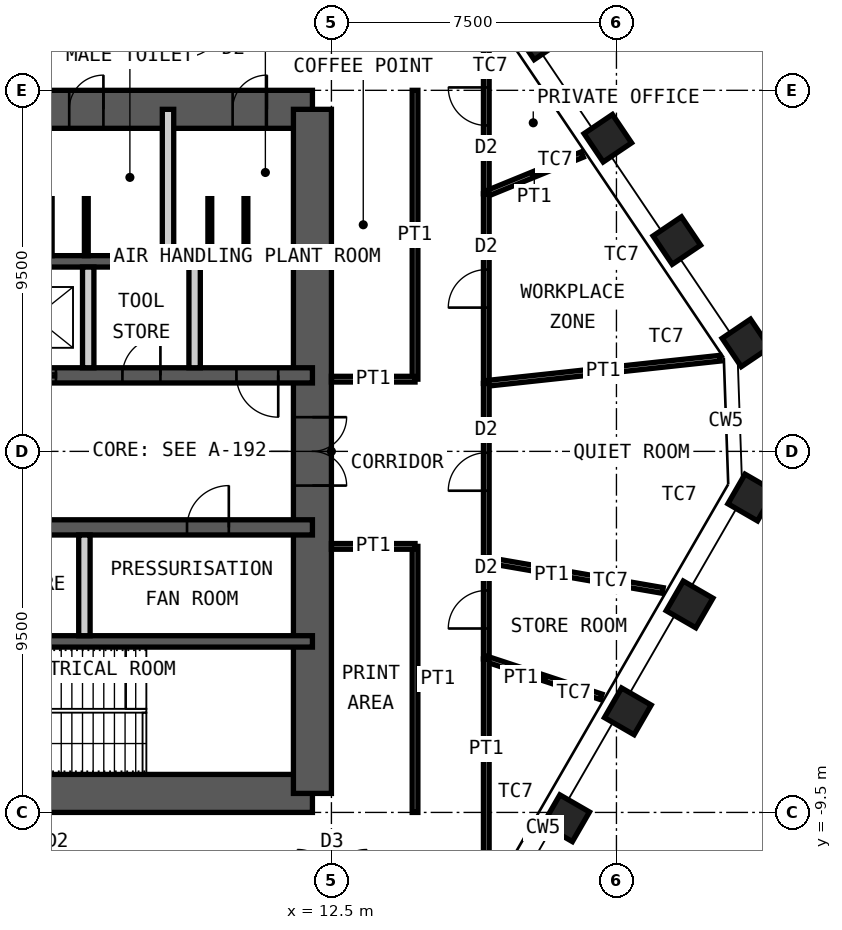
"""IFC4 building model, lengths in metres.
Left out: names, types, materials, properties, quantities, classifications, styles, units other than length and angle.
Written with IfcOpenShell. Run it as: python <this file> out.ifc"""

import sys

from ifc_helpers import new_model, si_unit, direction, frame, frame_2d, origin, origin_2d, place, context, subcontext, project, spatial, rectangle, hollow_rectangle, extrude, element, fill, save


model = new_model("IFC4")
c1 = context("Model", 3, precision=1e-05, world=origin(), true_north=direction((0.0, 1.0)))
c2 = subcontext(c1, "Body", "Model", "MODEL_VIEW")
j1 = project(units=[si_unit("LENGTHUNIT", "METRE"), si_unit("PLANEANGLEUNIT", "RADIAN")], contexts=[c1])
p1 = place(None, origin())
s1 = spatial("IfcSite", under=j1, at=p1, CompositionType="ELEMENT")
p2 = place(p1, origin())
s2 = spatial("IfcBuilding", under=s1, at=p2, CompositionType="ELEMENT")
p3 = place(p2, frame((0.0, 0.0, 283.0)))
s3 = spatial("IfcBuildingStorey", under=s2, at=p3, CompositionType="ELEMENT", Elevation=283.0)
for number, where, z_axis, x_axis in (
    (1, (17.957, 10.932, 0.0), (0.0, 0.0, 1.0), (-0.559, 0.829, 0.0)),
    (2, (19.773, 8.239, 0.0), (0.0, 0.0, 1.0), (-0.559, 0.829, 0.0)),
    (3, (21.589, 5.547, 0.0), (0.0, 0.0, 1.0), (-0.559, 0.829, 0.0)),
    (4, (23.406, 2.854, 0.0), (0.0, 0.0, 1.0), (-0.559, 0.829, 0.0)),
    (5, (23.548, -1.214, 0.0), (0.0, 0.0, 1.0), (0.5, 0.866, 0.0)),
    (6, (21.924, -4.027, 0.0), (0.0, 0.0, 1.0), (0.5, 0.866, 0.0)),
    (7, (20.3, -6.84, 0.0), (0.0, 0.0, 1.0), (0.5, 0.866, 0.0)),
    (8, (18.676, -9.653, 0.0), (0.0, 0.0, 1.0), (0.5, 0.866, 0.0)),
):
    element("IfcColumn", number, at=place(p3, frame(where, z_axis=z_axis, x_axis=x_axis)), inside=s3, PredefinedType="COLUMN", context=c2, shape_type="SweptSolid", body=[
        extrude(hollow_rectangle(XDim=0.9, YDim=0.9, WallThickness=0.06, at=origin_2d()), origin(), (0.0, 0.0, 1.0), 4.2),
    ])
p4 = place(p3, frame((-12.0, 9.0, 0.0), z_axis=(0.0, 0.0, 1.0), x_axis=(1.0, 0.0, 0.0)))
e9 = element("IfcWall", 9, at=p4, inside=s3, PredefinedType="SHEAR", context=c2, shape_type="SweptSolid", body=[
    extrude(rectangle(XDim=24.0, YDim=1.0, at=frame_2d((12.0, 0.0))), origin(), (0.0, 0.0, 1.0), 4.2),
])
p5 = place(p4, frame((10.4, 0.0, 0.0)))
e10 = element("IfcOpeningElement", 10, at=p5, cuts=e9, PredefinedType="OPENING", context=c2, shape_type="SweptSolid", body=[
    extrude(rectangle(XDim=1.0, YDim=2.1, at=frame_2d((0.5, 1.05))), frame((0.0, 0.51, 0.0), z_axis=(0.0, -1.0, 0.0), x_axis=(1.0, 0.0, 0.0)), (0.0, 0.0, 1.0), 1.02),
])
p6 = place(p4, frame((17.6, 0.0, 0.0)))
e11 = element("IfcOpeningElement", 11, at=p6, cuts=e9, PredefinedType="OPENING", context=c2, shape_type="SweptSolid", body=[
    extrude(rectangle(XDim=0.9, YDim=2.1, at=frame_2d((0.45, 1.05))), frame((0.0, 0.51, 0.0), z_axis=(0.0, -1.0, 0.0), x_axis=(1.0, 0.0, 0.0)), (0.0, 0.0, 1.0), 1.02),
])
p7 = place(p4, frame((21.9, 0.0, 0.0)))
e12 = element("IfcOpeningElement", 12, at=p7, cuts=e9, PredefinedType="OPENING", context=c2, shape_type="SweptSolid", body=[
    extrude(rectangle(XDim=0.9, YDim=2.1, at=frame_2d((0.45, 1.05))), frame((0.0, 0.51, 0.0), z_axis=(0.0, -1.0, 0.0), x_axis=(1.0, 0.0, 0.0)), (0.0, 0.0, 1.0), 1.02),
])
p8 = place(p3, frame((-12.0, -9.0, 0.0), z_axis=(0.0, 0.0, 1.0), x_axis=(1.0, 0.0, 0.0)))
e13 = element("IfcWall", 13, at=p8, inside=s3, PredefinedType="SHEAR", context=c2, shape_type="SweptSolid", body=[
    extrude(rectangle(XDim=24.0, YDim=1.0, at=frame_2d((12.0, 0.0))), origin(), (0.0, 0.0, 1.0), 4.2),
])
p9 = place(p8, frame((1.35, 0.0, 0.0)))
e14 = element("IfcOpeningElement", 14, at=p9, cuts=e13, PredefinedType="OPENING", context=c2, shape_type="SweptSolid", body=[
    extrude(rectangle(XDim=1.0, YDim=2.1, at=frame_2d((0.5, 1.05))), frame((0.0, 0.51, 0.0), z_axis=(0.0, -1.0, 0.0), x_axis=(1.0, 0.0, 0.0)), (0.0, 0.0, 1.0), 1.02),
])
p10 = place(p8, frame((5.325, 0.0, 0.0)))
e15 = element("IfcOpeningElement", 15, at=p10, cuts=e13, PredefinedType="OPENING", context=c2, shape_type="SweptSolid", body=[
    extrude(rectangle(XDim=1.15, YDim=2.1, at=frame_2d((0.575, 1.05))), frame((0.0, 0.51, 0.0), z_axis=(0.0, -1.0, 0.0), x_axis=(1.0, 0.0, 0.0)), (0.0, 0.0, 1.0), 1.02),
])
p11 = place(p8, frame((12.6, 0.0, 0.0)))
e16 = element("IfcOpeningElement", 16, at=p11, cuts=e13, PredefinedType="OPENING", context=c2, shape_type="SweptSolid", body=[
    extrude(rectangle(XDim=1.0, YDim=2.1, at=frame_2d((0.5, 1.05))), frame((0.0, 0.51, 0.0), z_axis=(0.0, -1.0, 0.0), x_axis=(1.0, 0.0, 0.0)), (0.0, 0.0, 1.0), 1.02),
])
p12 = place(p3, frame((12.0, -9.0, 0.0), z_axis=(0.0, 0.0, 1.0), x_axis=(0.0, 1.0, 0.0)))
e17 = element("IfcWall", 17, at=p12, inside=s3, PredefinedType="SHEAR", context=c2, shape_type="SweptSolid", body=[
    extrude(rectangle(XDim=18.0, YDim=1.0, at=frame_2d((9.0, 0.0))), origin(), (0.0, 0.0, 1.0), 4.2),
])
p13 = place(p12, frame((8.1, 0.0, 0.0)))
e18 = element("IfcOpeningElement", 18, at=p13, cuts=e17, PredefinedType="OPENING", context=c2, shape_type="SweptSolid", body=[
    extrude(rectangle(XDim=1.8, YDim=2.1, at=frame_2d((0.9, 1.05))), frame((0.0, 0.51, 0.0), z_axis=(0.0, -1.0, 0.0), x_axis=(1.0, 0.0, 0.0)), (0.0, 0.0, 1.0), 1.02),
])
p14 = place(p3, frame((-12.0, 5.0, 0.0), z_axis=(0.0, 0.0, 1.0), x_axis=(1.0, 0.0, 0.0)))
e19 = element("IfcWall", 19, at=p14, inside=s3, PredefinedType="SHEAR", context=c2, shape_type="SweptSolid", body=[
    extrude(rectangle(XDim=24.0, YDim=0.3, at=frame_2d((12.0, 0.0))), origin(), (0.0, 0.0, 1.0), 4.2),
])
p15 = place(p3, frame((-12.0, 2.0, 0.0), z_axis=(0.0, 0.0, 1.0), x_axis=(1.0, 0.0, 0.0)))
e20 = element("IfcWall", 20, at=p15, inside=s3, PredefinedType="SHEAR", context=c2, shape_type="SweptSolid", body=[
    extrude(rectangle(XDim=24.0, YDim=0.4, at=frame_2d((12.0, 0.0))), origin(), (0.0, 0.0, 1.0), 4.2),
])
p16 = place(p15, frame((2.4, 0.0, 0.0)))
e21 = element("IfcOpeningElement", 21, at=p16, cuts=e20, PredefinedType="OPENING", context=c2, shape_type="SweptSolid", body=[
    extrude(rectangle(XDim=1.1, YDim=2.1, at=frame_2d((0.55, 1.05))), frame((0.0, 0.21, 0.0), z_axis=(0.0, -1.0, 0.0), x_axis=(1.0, 0.0, 0.0)), (0.0, 0.0, 1.0), 0.42),
])
p17 = place(p15, frame((22.0, 0.0, 0.0)))
e22 = element("IfcOpeningElement", 22, at=p17, cuts=e20, PredefinedType="OPENING", context=c2, shape_type="SweptSolid", body=[
    extrude(rectangle(XDim=1.1, YDim=2.1, at=frame_2d((0.55, 1.05))), frame((0.0, 0.21, 0.0), z_axis=(0.0, -1.0, 0.0), x_axis=(1.0, 0.0, 0.0)), (0.0, 0.0, 1.0), 0.42),
])
p18 = place(p15, frame((10.15, 0.0, 0.0)))
e23 = element("IfcOpeningElement", 23, at=p18, cuts=e20, PredefinedType="OPENING", context=c2, shape_type="SweptSolid", body=[
    extrude(rectangle(XDim=1.0, YDim=2.1, at=frame_2d((0.5, 1.05))), frame((0.0, 0.21, 0.0), z_axis=(0.0, -1.0, 0.0), x_axis=(1.0, 0.0, 0.0)), (0.0, 0.0, 1.0), 0.42),
])
p19 = place(p15, frame((6.9, 0.0, 0.0)))
e24 = element("IfcOpeningElement", 24, at=p19, cuts=e20, PredefinedType="OPENING", context=c2, shape_type="SweptSolid", body=[
    extrude(rectangle(XDim=1.0, YDim=2.1, at=frame_2d((0.5, 1.05))), frame((0.0, 0.21, 0.0), z_axis=(0.0, -1.0, 0.0), x_axis=(1.0, 0.0, 0.0)), (0.0, 0.0, 1.0), 0.42),
])
p20 = place(p15, frame((13.35, 0.0, 0.0)))
e25 = element("IfcOpeningElement", 25, at=p20, cuts=e20, PredefinedType="OPENING", context=c2, shape_type="SweptSolid", body=[
    extrude(rectangle(XDim=1.1, YDim=2.4, at=frame_2d((0.55, 1.2))), frame((0.0, 0.21, 0.0), z_axis=(0.0, -1.0, 0.0), x_axis=(1.0, 0.0, 0.0)), (0.0, 0.0, 1.0), 0.42),
])
p21 = place(p15, frame((16.15, 0.0, 0.0)))
e26 = element("IfcOpeningElement", 26, at=p21, cuts=e20, PredefinedType="OPENING", context=c2, shape_type="SweptSolid", body=[
    extrude(rectangle(XDim=1.1, YDim=2.4, at=frame_2d((0.55, 1.2))), frame((0.0, 0.21, 0.0), z_axis=(0.0, -1.0, 0.0), x_axis=(1.0, 0.0, 0.0)), (0.0, 0.0, 1.0), 0.42),
])
p22 = place(p15, frame((19.0, 0.0, 0.0)))
e27 = element("IfcOpeningElement", 27, at=p22, cuts=e20, PredefinedType="OPENING", context=c2, shape_type="SweptSolid", body=[
    extrude(rectangle(XDim=1.0, YDim=2.1, at=frame_2d((0.5, 1.05))), frame((0.0, 0.21, 0.0), z_axis=(0.0, -1.0, 0.0), x_axis=(1.0, 0.0, 0.0)), (0.0, 0.0, 1.0), 0.42),
])
p23 = place(p3, frame((-12.0, -2.0, 0.0), z_axis=(0.0, 0.0, 1.0), x_axis=(1.0, 0.0, 0.0)))
e28 = element("IfcWall", 28, at=p23, inside=s3, PredefinedType="SHEAR", context=c2, shape_type="SweptSolid", body=[
    extrude(rectangle(XDim=24.0, YDim=0.4, at=frame_2d((12.0, 0.0))), origin(), (0.0, 0.0, 1.0), 4.2),
])
p24 = place(p23, frame((1.1, 0.0, 0.0)))
e29 = element("IfcOpeningElement", 29, at=p24, cuts=e28, PredefinedType="OPENING", context=c2, shape_type="SweptSolid", body=[
    extrude(rectangle(XDim=1.1, YDim=2.1, at=frame_2d((0.55, 1.05))), frame((0.0, 0.21, 0.0), z_axis=(0.0, -1.0, 0.0), x_axis=(1.0, 0.0, 0.0)), (0.0, 0.0, 1.0), 0.42),
])
p25 = place(p23, frame((13.55, 0.0, 0.0)))
e30 = element("IfcOpeningElement", 30, at=p25, cuts=e28, PredefinedType="OPENING", context=c2, shape_type="SweptSolid", body=[
    extrude(rectangle(XDim=1.1, YDim=2.1, at=frame_2d((0.55, 1.05))), frame((0.0, 0.21, 0.0), z_axis=(0.0, -1.0, 0.0), x_axis=(1.0, 0.0, 0.0)), (0.0, 0.0, 1.0), 0.42),
])
p26 = place(p23, frame((20.7, 0.0, 0.0)))
e31 = element("IfcOpeningElement", 31, at=p26, cuts=e28, PredefinedType="OPENING", context=c2, shape_type="SweptSolid", body=[
    extrude(rectangle(XDim=1.1, YDim=2.1, at=frame_2d((0.55, 1.05))), frame((0.0, 0.21, 0.0), z_axis=(0.0, -1.0, 0.0), x_axis=(1.0, 0.0, 0.0)), (0.0, 0.0, 1.0), 0.42),
])
p27 = place(p23, frame((4.0, 0.0, 0.0)))
e32 = element("IfcOpeningElement", 32, at=p27, cuts=e28, PredefinedType="OPENING", context=c2, shape_type="SweptSolid", body=[
    extrude(rectangle(XDim=1.0, YDim=2.1, at=frame_2d((0.5, 1.05))), frame((0.0, 0.21, 0.0), z_axis=(0.0, -1.0, 0.0), x_axis=(1.0, 0.0, 0.0)), (0.0, 0.0, 1.0), 0.42),
])
p28 = place(p23, frame((6.8, 0.0, 0.0)))
e33 = element("IfcOpeningElement", 33, at=p28, cuts=e28, PredefinedType="OPENING", context=c2, shape_type="SweptSolid", body=[
    extrude(rectangle(XDim=1.0, YDim=2.1, at=frame_2d((0.5, 1.05))), frame((0.0, 0.21, 0.0), z_axis=(0.0, -1.0, 0.0), x_axis=(1.0, 0.0, 0.0)), (0.0, 0.0, 1.0), 0.42),
])
p29 = place(p23, frame((9.6, 0.0, 0.0)))
e34 = element("IfcOpeningElement", 34, at=p29, cuts=e28, PredefinedType="OPENING", context=c2, shape_type="SweptSolid", body=[
    extrude(rectangle(XDim=1.0, YDim=2.1, at=frame_2d((0.5, 1.05))), frame((0.0, 0.21, 0.0), z_axis=(0.0, -1.0, 0.0), x_axis=(1.0, 0.0, 0.0)), (0.0, 0.0, 1.0), 0.42),
])
p30 = place(p3, frame((-12.0, -5.0, 0.0), z_axis=(0.0, 0.0, 1.0), x_axis=(1.0, 0.0, 0.0)))
e35 = element("IfcWall", 35, at=p30, inside=s3, PredefinedType="SHEAR", context=c2, shape_type="SweptSolid", body=[
    extrude(rectangle(XDim=24.0, YDim=0.3, at=frame_2d((12.0, 0.0))), origin(), (0.0, 0.0, 1.0), 4.2),
])
p31 = place(p3, frame((8.2, 5.15, 0.0), z_axis=(0.0, 0.0, 1.0), x_axis=(0.0, 1.0, 0.0)))
e36 = element("IfcWall", 36, at=p31, inside=s3, PredefinedType="PARTITIONING", context=c2, shape_type="SweptSolid", body=[
    extrude(rectangle(XDim=3.85, YDim=0.3, at=frame_2d((1.925, 0.0))), origin(), (0.0, 0.0, 1.0), 3.98),
])
for number, where, z_axis, x_axis in (
    (37, (6.1, 2.2, 0.0), (0.0, 0.0, 1.0), (0.0, 1.0, 0.0)),
    (38, (8.9, 2.2, 0.0), (0.0, 0.0, 1.0), (0.0, 1.0, 0.0)),
    (39, (6.0, -4.85, 0.0), (0.0, 0.0, 1.0), (0.0, 1.0, 0.0)),
):
    element("IfcWall", number, at=place(p3, frame(where, z_axis=z_axis, x_axis=x_axis)), inside=s3, PredefinedType="PARTITIONING", context=c2, shape_type="SweptSolid", body=[
        extrude(rectangle(XDim=2.65, YDim=0.3, at=frame_2d((1.325, 0.0))), origin(), (0.0, 0.0, 1.0), 3.98),
    ])
for number, where, z_axis, x_axis in (
    (40, (5.1, 5.15, 0.0), (0.0, 0.0, 1.0), (0.0, 1.0, 0.0)),
    (41, (6.05, 5.15, 0.0), (0.0, 0.0, 1.0), (0.0, 1.0, 0.0)),
    (42, (9.3, 5.15, 0.0), (0.0, 0.0, 1.0), (0.0, 1.0, 0.0)),
    (43, (10.25, 5.15, 0.0), (0.0, 0.0, 1.0), (0.0, 1.0, 0.0)),
):
    element("IfcWall", number, at=place(p3, frame(where, z_axis=z_axis, x_axis=x_axis)), inside=s3, PredefinedType="PARTITIONING", context=c2, shape_type="SweptSolid", body=[
        extrude(rectangle(XDim=1.5, YDim=0.1, at=frame_2d((0.75, 0.0))), origin(), (0.0, 0.0, 1.0), 2.1),
    ])
p32 = place(p3, frame((16.575, 11.375, 0.0), z_axis=(0.0, 0.0, 1.0), x_axis=(0.0, -1.0, 0.0)))
e44 = element("IfcWall", 44, at=p32, inside=s3, PredefinedType="PARTITIONING", context=c2, shape_type="SweptSolid", body=[
    extrude(rectangle(XDim=4.597, YDim=0.15, at=frame_2d((2.299, 0.0))), origin(), (0.0, 0.0, 1.0), 4.03),
])
p33 = place(p32, frame((1.799, 0.0, 0.0)))
e45 = element("IfcOpeningElement", 45, at=p33, cuts=e44, PredefinedType="OPENING", context=c2, shape_type="SweptSolid", body=[
    extrude(rectangle(XDim=1.0, YDim=2.4, at=frame_2d((0.5, 1.2))), frame((0.0, 0.085, 0.0), z_axis=(0.0, -1.0, 0.0), x_axis=(1.0, 0.0, 0.0)), (0.0, 0.0, 1.0), 0.17),
])
p34 = place(p3, frame((19.1, 7.81, 0.0), z_axis=(0.0, 0.0, 1.0), x_axis=(-0.925616791812, -0.378462091518, 0.0)))
e46 = element("IfcWall", 46, at=p34, inside=s3, PredefinedType="PARTITIONING", context=c2, shape_type="SweptSolid", body=[
    extrude(rectangle(XDim=2.728, YDim=0.15, at=frame_2d((1.364, 0.0))), origin(), (0.0, 0.0, 1.0), 3.33),
])
p35 = place(p3, frame((16.575, 6.778, 0.0), z_axis=(0.0, 0.0, 1.0), x_axis=(0.0, -1.0, 0.0)))
e47 = element("IfcWall", 47, at=p35, inside=s3, PredefinedType="PARTITIONING", context=c2, shape_type="SweptSolid", body=[
    extrude(rectangle(XDim=4.99, YDim=0.15, at=frame_2d((2.495, 0.0))), origin(), (0.0, 0.0, 1.0), 4.03),
])
p36 = place(p35, frame((1.995, 0.0, 0.0)))
e48 = element("IfcOpeningElement", 48, at=p36, cuts=e47, PredefinedType="OPENING", context=c2, shape_type="SweptSolid", body=[
    extrude(rectangle(XDim=1.0, YDim=2.4, at=frame_2d((0.5, 1.2))), frame((0.0, 0.085, 0.0), z_axis=(0.0, -1.0, 0.0), x_axis=(1.0, 0.0, 0.0)), (0.0, 0.0, 1.0), 0.17),
])
p37 = place(p3, frame((22.726, 2.452, 0.0), z_axis=(0.0, 0.0, 1.0), x_axis=(-0.994230957157, -0.107260448581, 0.0)))
e49 = element("IfcWall", 49, at=p37, inside=s3, PredefinedType="PARTITIONING", context=c2, shape_type="SweptSolid", body=[
    extrude(rectangle(XDim=6.187, YDim=0.15, at=frame_2d((3.093, 0.0))), origin(), (0.0, 0.0, 1.0), 4.03),
])
p38 = place(p3, frame((16.575, 1.788, 0.0), z_axis=(0.0, 0.0, 1.0), x_axis=(0.0, -1.0, 0.0)))
e50 = element("IfcWall", 50, at=p38, inside=s3, PredefinedType="PARTITIONING", context=c2, shape_type="SweptSolid", body=[
    extrude(rectangle(XDim=4.647, YDim=0.15, at=frame_2d((2.324, 0.0))), origin(), (0.0, 0.0, 1.0), 4.03),
])
p39 = place(p38, frame((1.824, 0.0, 0.0)))
e51 = element("IfcOpeningElement", 51, at=p39, cuts=e50, PredefinedType="OPENING", context=c2, shape_type="SweptSolid", body=[
    extrude(rectangle(XDim=1.0, YDim=2.4, at=frame_2d((0.5, 1.2))), frame((0.0, 0.085, 0.0), z_axis=(0.0, -1.0, 0.0), x_axis=(1.0, 0.0, 0.0)), (0.0, 0.0, 1.0), 0.17),
])
p40 = place(p3, frame((21.219, -3.66, 0.0), z_axis=(0.0, 0.0, 1.0), x_axis=(-0.985448448161, 0.16997457462, 0.0)))
e52 = element("IfcWall", 52, at=p40, inside=s3, PredefinedType="PARTITIONING", context=c2, shape_type="SweptSolid", body=[
    extrude(rectangle(XDim=4.713, YDim=0.15, at=frame_2d((2.356, 0.0))), origin(), (0.0, 0.0, 1.0), 4.03),
])
p41 = place(p3, frame((16.575, -2.859, 0.0), z_axis=(0.0, 0.0, 1.0), x_axis=(0.0, -1.0, 0.0)))
e53 = element("IfcWall", 53, at=p41, inside=s3, PredefinedType="PARTITIONING", context=c2, shape_type="SweptSolid", body=[
    extrude(rectangle(XDim=2.603, YDim=0.15, at=frame_2d((1.302, 0.0))), origin(), (0.0, 0.0, 1.0), 4.03),
])
p42 = place(p41, frame((0.802, 0.0, 0.0)))
e54 = element("IfcOpeningElement", 54, at=p42, cuts=e53, PredefinedType="OPENING", context=c2, shape_type="SweptSolid", body=[
    extrude(rectangle(XDim=1.0, YDim=2.4, at=frame_2d((0.5, 1.2))), frame((0.0, 0.085, 0.0), z_axis=(0.0, -1.0, 0.0), x_axis=(1.0, 0.0, 0.0)), (0.0, 0.0, 1.0), 0.17),
])
p43 = place(p3, frame((19.598, -6.459, 0.0), z_axis=(0.0, 0.0, 1.0), x_axis=(-0.949759114669, 0.312981827113, 0.0)))
e55 = element("IfcWall", 55, at=p43, inside=s3, PredefinedType="PARTITIONING", context=c2, shape_type="SweptSolid", body=[
    extrude(rectangle(XDim=3.183, YDim=0.15, at=frame_2d((1.592, 0.0))), origin(), (0.0, 0.0, 1.0), 3.33),
])
p44 = place(p3, frame((16.575, -5.462, 0.0), z_axis=(0.0, 0.0, 1.0), x_axis=(0.0, -1.0, 0.0)))
e56 = element("IfcWall", 56, at=p44, inside=s3, PredefinedType="PARTITIONING", context=c2, shape_type="SweptSolid", body=[
    extrude(rectangle(XDim=5.913, YDim=0.15, at=frame_2d((2.956, 0.0))), origin(), (0.0, 0.0, 1.0), 4.03),
])
p45 = place(p3, frame((14.7, 1.9, 0.0), z_axis=(0.0, 0.0, 1.0), x_axis=(0.0, 1.0, 0.0)))
e57 = element("IfcWall", 57, at=p45, inside=s3, PredefinedType="PARTITIONING", context=c2, shape_type="SweptSolid", body=[
    extrude(rectangle(XDim=7.6, YDim=0.15, at=frame_2d((3.8, 0.0))), origin(), (0.0, 0.0, 1.0), 4.03),
])
p46 = place(p3, frame((12.5, 1.9, 0.0), z_axis=(0.0, 0.0, 1.0), x_axis=(1.0, 0.0, 0.0)))
e58 = element("IfcWall", 58, at=p46, inside=s3, PredefinedType="PARTITIONING", context=c2, shape_type="SweptSolid", body=[
    extrude(rectangle(XDim=2.2, YDim=0.15, at=frame_2d((1.1, 0.0))), origin(), (0.0, 0.0, 1.0), 2.93),
])
p47 = place(p3, frame((14.7, -9.5, 0.0), z_axis=(0.0, 0.0, 1.0), x_axis=(0.0, 1.0, 0.0)))
e59 = element("IfcWall", 59, at=p47, inside=s3, PredefinedType="PARTITIONING", context=c2, shape_type="SweptSolid", body=[
    extrude(rectangle(XDim=7.0, YDim=0.15, at=frame_2d((3.5, 0.0))), origin(), (0.0, 0.0, 1.0), 4.03),
])
p48 = place(p3, frame((12.5, -2.5, 0.0), z_axis=(0.0, 0.0, 1.0), x_axis=(1.0, 0.0, 0.0)))
e60 = element("IfcWall", 60, at=p48, inside=s3, PredefinedType="PARTITIONING", context=c2, shape_type="SweptSolid", body=[
    extrude(rectangle(XDim=2.2, YDim=0.15, at=frame_2d((1.1, 0.0))), origin(), (0.0, 0.0, 1.0), 3.33),
])
p49 = place(p6, origin())
e61 = element("IfcDoor", 61, at=p49, inside=s3, OperationType="SINGLE_SWING_LEFT", PredefinedType="DOOR", context=c2, shape_type="SweptSolid", body=[
    extrude(rectangle(XDim=0.9, YDim=2.1, at=frame_2d((0.45, 1.05))), frame((0.0, 0.025, 0.0), z_axis=(0.0, -1.0, 0.0), x_axis=(1.0, 0.0, 0.0)), (0.0, 0.0, 1.0), 0.05),
])
fill(e11, e61)
p50 = place(p7, origin())
e62 = element("IfcDoor", 62, at=p50, inside=s3, OperationType="SINGLE_SWING_LEFT", PredefinedType="DOOR", context=c2, shape_type="SweptSolid", body=[
    extrude(rectangle(XDim=0.9, YDim=2.1, at=frame_2d((0.45, 1.05))), frame((0.0, 0.025, 0.0), z_axis=(0.0, -1.0, 0.0), x_axis=(1.0, 0.0, 0.0)), (0.0, 0.0, 1.0), 0.05),
])
fill(e12, e62)
p51 = place(p17, origin())
e63 = element("IfcDoor", 63, at=p51, inside=s3, OperationType="SINGLE_SWING_RIGHT", PredefinedType="DOOR", context=c2, shape_type="SweptSolid", body=[
    extrude(rectangle(XDim=1.1, YDim=2.1, at=frame_2d((0.55, 1.05))), frame((0.0, 0.025, 0.0), z_axis=(0.0, -1.0, 0.0), x_axis=(1.0, 0.0, 0.0)), (0.0, 0.0, 1.0), 0.05),
])
fill(e22, e63)
p52 = place(p26, origin())
e64 = element("IfcDoor", 64, at=p52, inside=s3, OperationType="SINGLE_SWING_LEFT", PredefinedType="DOOR", context=c2, shape_type="SweptSolid", body=[
    extrude(rectangle(XDim=1.1, YDim=2.1, at=frame_2d((0.55, 1.05))), frame((0.0, 0.025, 0.0), z_axis=(0.0, -1.0, 0.0), x_axis=(1.0, 0.0, 0.0)), (0.0, 0.0, 1.0), 0.05),
])
fill(e31, e64)
p53 = place(p13, origin())
e65 = element("IfcDoor", 65, at=p53, inside=s3, OperationType="DOUBLE_DOOR_DOUBLE_SWING", PredefinedType="DOOR", context=c2, shape_type="SweptSolid", body=[
    extrude(rectangle(XDim=1.8, YDim=2.1, at=frame_2d((0.9, 1.05))), frame((0.0, 0.025, 0.0), z_axis=(0.0, -1.0, 0.0), x_axis=(1.0, 0.0, 0.0)), (0.0, 0.0, 1.0), 0.05),
])
fill(e18, e65)
p54 = place(p21, origin())
e66 = element("IfcDoor", 66, at=p54, inside=s3, OperationType="DOUBLE_DOOR_SLIDING", PredefinedType="DOOR", context=c2, shape_type="SweptSolid", body=[
    extrude(rectangle(XDim=1.1, YDim=2.4, at=frame_2d((0.55, 1.2))), frame((0.0, 0.025, 0.0), z_axis=(0.0, -1.0, 0.0), x_axis=(1.0, 0.0, 0.0)), (0.0, 0.0, 1.0), 0.05),
])
fill(e26, e66)
p55 = place(p22, origin())
e67 = element("IfcDoor", 67, at=p55, inside=s3, OperationType="SINGLE_SWING_LEFT", PredefinedType="DOOR", context=c2, shape_type="SweptSolid", body=[
    extrude(rectangle(XDim=1.0, YDim=2.1, at=frame_2d((0.5, 1.05))), frame((0.0, 0.025, 0.0), z_axis=(0.0, -1.0, 0.0), x_axis=(1.0, 0.0, 0.0)), (0.0, 0.0, 1.0), 0.05),
])
fill(e27, e67)
p56 = place(p33, origin())
e68 = element("IfcDoor", 68, at=p56, inside=s3, OperationType="SINGLE_SWING_LEFT", PredefinedType="DOOR", context=c2, shape_type="SweptSolid", body=[
    extrude(rectangle(XDim=1.0, YDim=2.4, at=frame_2d((0.5, 1.2))), frame((0.0, 0.025, 0.0), z_axis=(0.0, -1.0, 0.0), x_axis=(1.0, 0.0, 0.0)), (0.0, 0.0, 1.0), 0.05),
])
fill(e45, e68)
p57 = place(p36, origin())
e69 = element("IfcDoor", 69, at=p57, inside=s3, OperationType="SINGLE_SWING_RIGHT", PredefinedType="DOOR", context=c2, shape_type="SweptSolid", body=[
    extrude(rectangle(XDim=1.0, YDim=2.4, at=frame_2d((0.5, 1.2))), frame((0.0, 0.025, 0.0), z_axis=(0.0, -1.0, 0.0), x_axis=(1.0, 0.0, 0.0)), (0.0, 0.0, 1.0), 0.05),
])
fill(e48, e69)
p58 = place(p39, origin())
e70 = element("IfcDoor", 70, at=p58, inside=s3, OperationType="SINGLE_SWING_RIGHT", PredefinedType="DOOR", context=c2, shape_type="SweptSolid", body=[
    extrude(rectangle(XDim=1.0, YDim=2.4, at=frame_2d((0.5, 1.2))), frame((0.0, 0.025, 0.0), z_axis=(0.0, -1.0, 0.0), x_axis=(1.0, 0.0, 0.0)), (0.0, 0.0, 1.0), 0.05),
])
fill(e51, e70)
p59 = place(p42, origin())
e71 = element("IfcDoor", 71, at=p59, inside=s3, OperationType="SINGLE_SWING_RIGHT", PredefinedType="DOOR", context=c2, shape_type="SweptSolid", body=[
    extrude(rectangle(XDim=1.0, YDim=2.4, at=frame_2d((0.5, 1.2))), frame((0.0, 0.025, 0.0), z_axis=(0.0, -1.0, 0.0), x_axis=(1.0, 0.0, 0.0)), (0.0, 0.0, 1.0), 0.05),
])
fill(e54, e71)
save(model, sys.argv[1])
